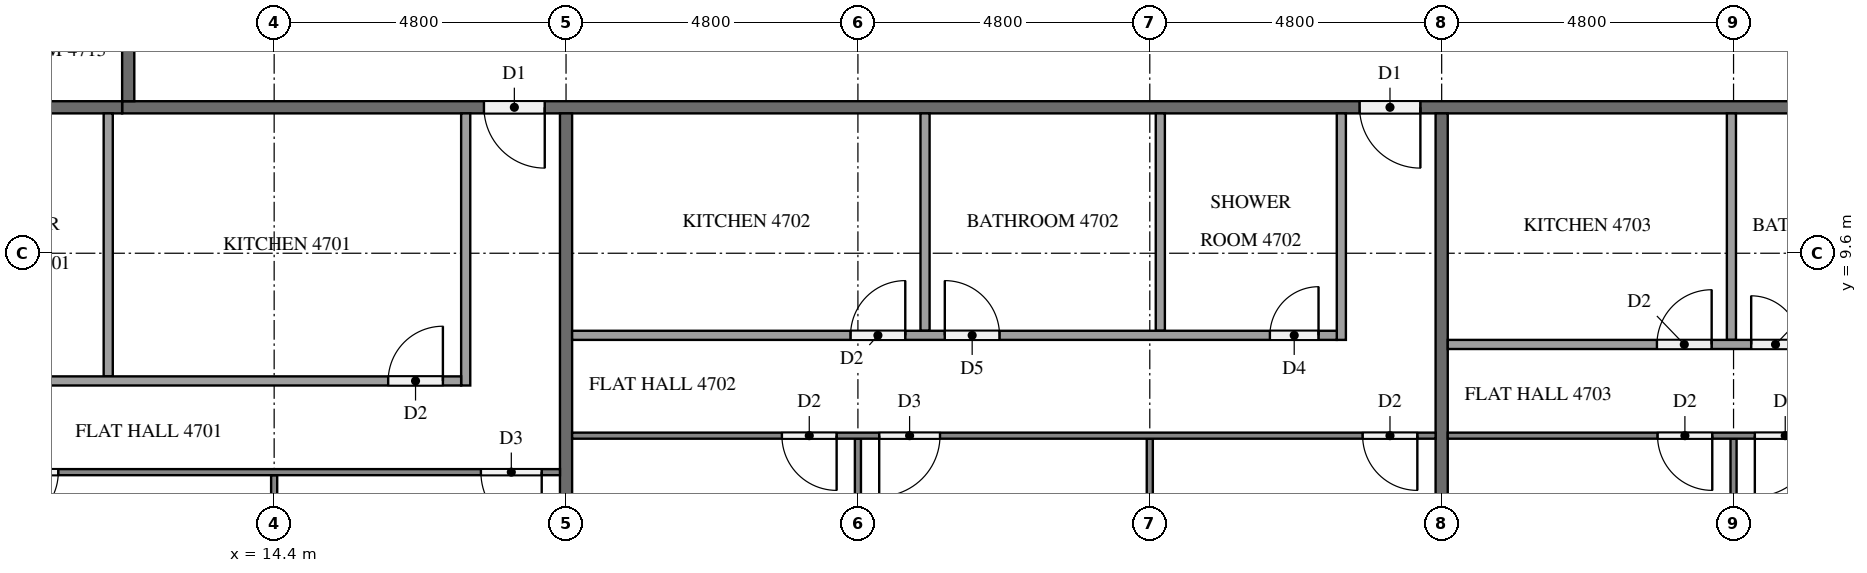
"""IFC4 building model, lengths in metres.
Left out: names, types, materials, properties, quantities, classifications, styles, units other than length and angle.
Written with IfcOpenShell. Run it as: python <this file> out.ifc"""

import sys

from ifc_helpers import new_model, si_unit, direction, frame, frame_2d, origin, place, context, subcontext, project, spatial, rectangle, extrude, element, fill, save


model = new_model("IFC4")
c1 = context("Model", 3, precision=1e-05, world=origin(), true_north=direction((0.0, 1.0)))
c2 = subcontext(c1, "Body", "Model", "MODEL_VIEW")
j1 = project(units=[si_unit("LENGTHUNIT", "METRE"), si_unit("PLANEANGLEUNIT", "RADIAN")], contexts=[c1])
p1 = place(None, origin())
s1 = spatial("IfcSite", under=j1, at=p1, CompositionType="ELEMENT")
p2 = place(p1, origin())
s2 = spatial("IfcBuilding", under=s1, at=p2, CompositionType="ELEMENT")
p3 = place(p2, frame((0.0, 0.0, 182.4)))
s3 = spatial("IfcBuildingStorey", under=s2, at=p3, CompositionType="ELEMENT", Elevation=182.4)
p4 = place(p3, frame((50.5, 12.0, 0.0), z_axis=(0.0, 0.0, 1.0), x_axis=(-1.0, 0.0, 0.0)))
e1 = element("IfcWall", 1, at=p4, inside=s3, PredefinedType="PARTITIONING", context=c2, shape_type="SweptSolid", body=[
    extrude(rectangle(XDim=38.6, YDim=0.2, at=frame_2d((19.3, 0.0))), origin(), (0.0, 0.0, 1.0), 3.2),
])
p5 = place(p4, frame((31.65, 0.0, 0.0)))
e2 = element("IfcOpeningElement", 2, at=p5, cuts=e1, PredefinedType="OPENING", context=c2, shape_type="SweptSolid", body=[
    extrude(rectangle(XDim=1.0, YDim=2.1, at=frame_2d((0.5, 1.05))), frame((0.0, 0.11, 0.0), z_axis=(0.0, -1.0, 0.0), x_axis=(1.0, 0.0, 0.0)), (0.0, 0.0, 1.0), 0.22),
])
p6 = place(p4, frame((17.25, 0.0, 0.0)))
e3 = element("IfcOpeningElement", 3, at=p6, cuts=e1, PredefinedType="OPENING", context=c2, shape_type="SweptSolid", body=[
    extrude(rectangle(XDim=1.0, YDim=2.1, at=frame_2d((0.5, 1.05))), frame((0.0, 0.11, 0.0), z_axis=(0.0, -1.0, 0.0), x_axis=(1.0, 0.0, 0.0)), (0.0, 0.0, 1.0), 0.22),
])
p7 = place(p4, frame((7.65, 0.0, 0.0)))
e4 = element("IfcOpeningElement", 4, at=p7, cuts=e1, PredefinedType="OPENING", context=c2, shape_type="SweptSolid", body=[
    extrude(rectangle(XDim=1.0, YDim=2.1, at=frame_2d((0.5, 1.05))), frame((0.0, 0.11, 0.0), z_axis=(0.0, -1.0, 0.0), x_axis=(1.0, 0.0, 0.0)), (0.0, 0.0, 1.0), 0.22),
])
p8 = place(p4, frame((5.9, 0.0, 0.0)))
e5 = element("IfcOpeningElement", 5, at=p8, cuts=e1, PredefinedType="OPENING", context=c2, shape_type="SweptSolid", body=[
    extrude(rectangle(XDim=1.1, YDim=2.1, at=frame_2d((0.55, 1.05))), frame((0.0, 0.11, 0.0), z_axis=(0.0, -1.0, 0.0), x_axis=(1.0, 0.0, 0.0)), (0.0, 0.0, 1.0), 0.22),
])
p9 = place(p3, frame((12.0, 12.1, 0.0), z_axis=(0.0, 0.0, 1.0), x_axis=(0.0, 1.0, 0.0)))
e6 = element("IfcWall", 6, at=p9, inside=s3, PredefinedType="PARTITIONING", context=c2, shape_type="SweptSolid", body=[
    extrude(rectangle(XDim=28.6, YDim=0.2, at=frame_2d((14.3, 0.0))), origin(), (0.0, 0.0, 1.0), 3.2),
])
p10 = place(p9, frame((26.65, 0.0, 0.0)))
e7 = element("IfcOpeningElement", 7, at=p10, cuts=e6, PredefinedType="OPENING", context=c2, shape_type="SweptSolid", body=[
    extrude(rectangle(XDim=1.0, YDim=2.1, at=frame_2d((0.5, 1.05))), frame((0.0, 0.11, 0.0), z_axis=(0.0, -1.0, 0.0), x_axis=(1.0, 0.0, 0.0)), (0.0, 0.0, 1.0), 0.22),
])
p11 = place(p9, frame((24.95, 0.0, 0.0)))
e8 = element("IfcOpeningElement", 8, at=p11, cuts=e6, PredefinedType="OPENING", context=c2, shape_type="SweptSolid", body=[
    extrude(rectangle(XDim=1.0, YDim=2.1, at=frame_2d((0.5, 1.05))), frame((0.0, 0.11, 0.0), z_axis=(0.0, -1.0, 0.0), x_axis=(1.0, 0.0, 0.0)), (0.0, 0.0, 1.0), 0.22),
])
p12 = place(p9, frame((12.95, 0.0, 0.0)))
e9 = element("IfcOpeningElement", 9, at=p12, cuts=e6, PredefinedType="OPENING", context=c2, shape_type="SweptSolid", body=[
    extrude(rectangle(XDim=1.0, YDim=2.1, at=frame_2d((0.5, 1.05))), frame((0.0, 0.11, 0.0), z_axis=(0.0, -1.0, 0.0), x_axis=(1.0, 0.0, 0.0)), (0.0, 0.0, 1.0), 0.22),
])
p13 = place(p3, frame((19.2, 11.9, 0.0), z_axis=(0.0, 0.0, 1.0), x_axis=(0.0, -1.0, 0.0)))
e10 = element("IfcWall", 10, at=p13, inside=s3, PredefinedType="PARTITIONING", context=c2, shape_type="SweptSolid", body=[
    extrude(rectangle(XDim=11.575, YDim=0.2, at=frame_2d((5.788, 0.0))), origin(), (0.0, 0.0, 1.0), 3.2),
])
p14 = place(p3, frame((4.9, 12.0, 0.0), z_axis=(0.0, 0.0, 1.0), x_axis=(1.0, 0.0, 0.0)))
e11 = element("IfcWall", 11, at=p14, inside=s3, PredefinedType="PARTITIONING", context=c2, shape_type="SweptSolid", body=[
    extrude(rectangle(XDim=7.0, YDim=0.2, at=frame_2d((3.5, 0.0))), origin(), (0.0, 0.0, 1.0), 3.2),
])
p15 = place(p3, frame((33.6, 11.9, 0.0), z_axis=(0.0, 0.0, 1.0), x_axis=(0.0, -1.0, 0.0)))
e12 = element("IfcWall", 12, at=p15, inside=s3, PredefinedType="PARTITIONING", context=c2, shape_type="SweptSolid", body=[
    extrude(rectangle(XDim=11.8, YDim=0.2, at=frame_2d((5.9, 0.0))), origin(), (0.0, 0.0, 1.0), 3.2),
])
p16 = place(p3, frame((14.4, 5.95, 0.0), z_axis=(0.0, 0.0, 1.0), x_axis=(0.0, -1.0, 0.0)))
e13 = element("IfcWall", 13, at=p16, inside=s3, PredefinedType="PARTITIONING", context=c2, shape_type="SweptSolid", body=[
    extrude(rectangle(XDim=5.85, YDim=0.1, at=frame_2d((2.925, 0.0))), origin(), (0.0, 0.0, 1.0), 3.2),
])
p17 = place(p3, frame((19.1, 6.0, 0.0), z_axis=(0.0, 0.0, 1.0), x_axis=(-1.0, 0.0, 0.0)))
e14 = element("IfcWall", 14, at=p17, inside=s3, PredefinedType="PARTITIONING", context=c2, shape_type="SweptSolid", body=[
    extrude(rectangle(XDim=14.2, YDim=0.1, at=frame_2d((7.1, 0.0))), origin(), (0.0, 0.0, 1.0), 3.2),
])
p18 = place(p17, frame((0.3, 0.0, 0.0)))
e15 = element("IfcOpeningElement", 15, at=p18, cuts=e14, PredefinedType="OPENING", context=c2, shape_type="SweptSolid", body=[
    extrude(rectangle(XDim=1.0, YDim=2.1, at=frame_2d((0.5, 1.05))), frame((0.0, 0.06, 0.0), z_axis=(0.0, -1.0, 0.0), x_axis=(1.0, 0.0, 0.0)), (0.0, 0.0, 1.0), 0.12),
])
p19 = place(p17, frame((8.25, 0.0, 0.0)))
e16 = element("IfcOpeningElement", 16, at=p19, cuts=e14, PredefinedType="OPENING", context=c2, shape_type="SweptSolid", body=[
    extrude(rectangle(XDim=0.9, YDim=2.1, at=frame_2d((0.45, 1.05))), frame((0.0, 0.06, 0.0), z_axis=(0.0, -1.0, 0.0), x_axis=(1.0, 0.0, 0.0)), (0.0, 0.0, 1.0), 0.12),
])
p20 = place(p17, frame((9.85, 0.0, 0.0)))
e17 = element("IfcOpeningElement", 17, at=p20, cuts=e14, PredefinedType="OPENING", context=c2, shape_type="SweptSolid", body=[
    extrude(rectangle(XDim=0.9, YDim=2.1, at=frame_2d((0.45, 1.05))), frame((0.0, 0.06, 0.0), z_axis=(0.0, -1.0, 0.0), x_axis=(1.0, 0.0, 0.0)), (0.0, 0.0, 1.0), 0.12),
])
p21 = place(p3, frame((11.671, 11.9, 0.0), z_axis=(0.0, 0.0, 1.0), x_axis=(0.0, -1.0, 0.0)))
e18 = element("IfcWall", 18, at=p21, inside=s3, PredefinedType="PARTITIONING", context=c2, shape_type="SweptSolid", body=[
    extrude(rectangle(XDim=4.325, YDim=0.15, at=frame_2d((2.163, 0.0))), origin(), (0.0, 0.0, 1.0), 3.2),
])
p22 = place(p3, frame((17.55, 11.9, 0.0), z_axis=(0.0, 0.0, 1.0), x_axis=(0.0, -1.0, 0.0)))
e19 = element("IfcWall", 19, at=p22, inside=s3, PredefinedType="PARTITIONING", context=c2, shape_type="SweptSolid", body=[
    extrude(rectangle(XDim=4.475, YDim=0.15, at=frame_2d((2.237, 0.0))), origin(), (0.0, 0.0, 1.0), 3.2),
])
p23 = place(p3, frame((4.9, 7.5, 0.0), z_axis=(0.0, 0.0, 1.0), x_axis=(1.0, 0.0, 0.0)))
e20 = element("IfcWall", 20, at=p23, inside=s3, PredefinedType="PARTITIONING", context=c2, shape_type="SweptSolid", body=[
    extrude(rectangle(XDim=12.575, YDim=0.15, at=frame_2d((6.288, 0.0))), origin(), (0.0, 0.0, 1.0), 3.2),
])
p24 = place(p23, frame((11.375, 0.0, 0.0)))
e21 = element("IfcOpeningElement", 21, at=p24, cuts=e20, PredefinedType="OPENING", context=c2, shape_type="SweptSolid", body=[
    extrude(rectangle(XDim=0.9, YDim=2.1, at=frame_2d((0.45, 1.05))), frame((0.0, 0.085, 0.0), z_axis=(0.0, -1.0, 0.0), x_axis=(1.0, 0.0, 0.0)), (0.0, 0.0, 1.0), 0.17),
])
p25 = place(p23, frame((4.194, 0.0, 0.0)))
e22 = element("IfcOpeningElement", 22, at=p25, cuts=e20, PredefinedType="OPENING", context=c2, shape_type="SweptSolid", body=[
    extrude(rectangle(XDim=0.8, YDim=2.1, at=frame_2d((0.4, 1.05))), frame((0.0, 0.085, 0.0), z_axis=(0.0, -1.0, 0.0), x_axis=(1.0, 0.0, 0.0)), (0.0, 0.0, 1.0), 0.17),
])
p26 = place(p23, frame((2.644, 0.0, 0.0)))
e23 = element("IfcOpeningElement", 23, at=p26, cuts=e20, PredefinedType="OPENING", context=c2, shape_type="SweptSolid", body=[
    extrude(rectangle(XDim=0.9, YDim=2.1, at=frame_2d((0.45, 1.05))), frame((0.0, 0.085, 0.0), z_axis=(0.0, -1.0, 0.0), x_axis=(1.0, 0.0, 0.0)), (0.0, 0.0, 1.0), 0.17),
])
p27 = place(p3, frame((28.8, 6.55, 0.0), z_axis=(0.0, 0.0, 1.0), x_axis=(0.0, -1.0, 0.0)))
e24 = element("IfcWall", 24, at=p27, inside=s3, PredefinedType="PARTITIONING", context=c2, shape_type="SweptSolid", body=[
    extrude(rectangle(XDim=6.225, YDim=0.1, at=frame_2d((3.113, 0.0))), origin(), (0.0, 0.0, 1.0), 3.2),
])
p28 = place(p3, frame((24.0, 6.55, 0.0), z_axis=(0.0, 0.0, 1.0), x_axis=(0.0, -1.0, 0.0)))
e25 = element("IfcWall", 25, at=p28, inside=s3, PredefinedType="PARTITIONING", context=c2, shape_type="SweptSolid", body=[
    extrude(rectangle(XDim=6.45, YDim=0.1, at=frame_2d((3.225, 0.0))), origin(), (0.0, 0.0, 1.0), 3.2),
])
p29 = place(p3, frame((33.5, 6.6, 0.0), z_axis=(0.0, 0.0, 1.0), x_axis=(-1.0, 0.0, 0.0)))
e26 = element("IfcWall", 26, at=p29, inside=s3, PredefinedType="PARTITIONING", context=c2, shape_type="SweptSolid", body=[
    extrude(rectangle(XDim=14.2, YDim=0.1, at=frame_2d((7.1, 0.0))), origin(), (0.0, 0.0, 1.0), 3.2),
])
p30 = place(p29, frame((0.3, 0.0, 0.0)))
e27 = element("IfcOpeningElement", 27, at=p30, cuts=e26, PredefinedType="OPENING", context=c2, shape_type="SweptSolid", body=[
    extrude(rectangle(XDim=0.9, YDim=2.1, at=frame_2d((0.45, 1.05))), frame((0.0, 0.06, 0.0), z_axis=(0.0, -1.0, 0.0), x_axis=(1.0, 0.0, 0.0)), (0.0, 0.0, 1.0), 0.12),
])
p31 = place(p29, frame((8.15, 0.0, 0.0)))
e28 = element("IfcOpeningElement", 28, at=p31, cuts=e26, PredefinedType="OPENING", context=c2, shape_type="SweptSolid", body=[
    extrude(rectangle(XDim=1.0, YDim=2.1, at=frame_2d((0.5, 1.05))), frame((0.0, 0.06, 0.0), z_axis=(0.0, -1.0, 0.0), x_axis=(1.0, 0.0, 0.0)), (0.0, 0.0, 1.0), 0.12),
])
p32 = place(p29, frame((9.85, 0.0, 0.0)))
e29 = element("IfcOpeningElement", 29, at=p32, cuts=e26, PredefinedType="OPENING", context=c2, shape_type="SweptSolid", body=[
    extrude(rectangle(XDim=0.9, YDim=2.1, at=frame_2d((0.45, 1.05))), frame((0.0, 0.06, 0.0), z_axis=(0.0, -1.0, 0.0), x_axis=(1.0, 0.0, 0.0)), (0.0, 0.0, 1.0), 0.12),
])
for number, where, z_axis, x_axis in (
    (30, (28.973, 11.9, 0.0), (0.0, 0.0, 1.0), (0.0, -1.0, 0.0)),
    (31, (25.104, 11.9, 0.0), (0.0, 0.0, 1.0), (0.0, -1.0, 0.0)),
):
    element("IfcWall", number, at=place(p3, frame(where, z_axis=z_axis, x_axis=x_axis)), inside=s3, PredefinedType="PARTITIONING", context=c2, shape_type="SweptSolid", body=[
        extrude(rectangle(XDim=3.575, YDim=0.15, at=frame_2d((1.788, 0.0))), origin(), (0.0, 0.0, 1.0), 3.2),
    ])
p33 = place(p3, frame((31.95, 11.9, 0.0), z_axis=(0.0, 0.0, 1.0), x_axis=(0.0, -1.0, 0.0)))
e32 = element("IfcWall", 32, at=p33, inside=s3, PredefinedType="PARTITIONING", context=c2, shape_type="SweptSolid", body=[
    extrude(rectangle(XDim=3.725, YDim=0.15, at=frame_2d((1.862, 0.0))), origin(), (0.0, 0.0, 1.0), 3.2),
])
p34 = place(p3, frame((19.3, 8.25, 0.0), z_axis=(0.0, 0.0, 1.0), x_axis=(1.0, 0.0, 0.0)))
e33 = element("IfcWall", 33, at=p34, inside=s3, PredefinedType="PARTITIONING", context=c2, shape_type="SweptSolid", body=[
    extrude(rectangle(XDim=12.575, YDim=0.15, at=frame_2d((6.288, 0.0))), origin(), (0.0, 0.0, 1.0), 3.2),
])
p35 = place(p34, frame((11.475, 0.0, 0.0)))
e34 = element("IfcOpeningElement", 34, at=p35, cuts=e33, PredefinedType="OPENING", context=c2, shape_type="SweptSolid", body=[
    extrude(rectangle(XDim=0.8, YDim=2.1, at=frame_2d((0.4, 1.05))), frame((0.0, 0.085, 0.0), z_axis=(0.0, -1.0, 0.0), x_axis=(1.0, 0.0, 0.0)), (0.0, 0.0, 1.0), 0.17),
])
p36 = place(p34, frame((6.129, 0.0, 0.0)))
e35 = element("IfcOpeningElement", 35, at=p36, cuts=e33, PredefinedType="OPENING", context=c2, shape_type="SweptSolid", body=[
    extrude(rectangle(XDim=0.9, YDim=2.1, at=frame_2d((0.45, 1.05))), frame((0.0, 0.085, 0.0), z_axis=(0.0, -1.0, 0.0), x_axis=(1.0, 0.0, 0.0)), (0.0, 0.0, 1.0), 0.17),
])
p37 = place(p34, frame((4.579, 0.0, 0.0)))
e36 = element("IfcOpeningElement", 36, at=p37, cuts=e33, PredefinedType="OPENING", context=c2, shape_type="SweptSolid", body=[
    extrude(rectangle(XDim=0.9, YDim=2.1, at=frame_2d((0.45, 1.05))), frame((0.0, 0.085, 0.0), z_axis=(0.0, -1.0, 0.0), x_axis=(1.0, 0.0, 0.0)), (0.0, 0.0, 1.0), 0.17),
])
p38 = place(p3, frame((38.4, 6.55, 0.0), z_axis=(0.0, 0.0, 1.0), x_axis=(0.0, -1.0, 0.0)))
e37 = element("IfcWall", 37, at=p38, inside=s3, PredefinedType="PARTITIONING", context=c2, shape_type="SweptSolid", body=[
    extrude(rectangle(XDim=6.225, YDim=0.1, at=frame_2d((3.113, 0.0))), origin(), (0.0, 0.0, 1.0), 3.2),
])
p39 = place(p3, frame((43.1, 6.6, 0.0), z_axis=(0.0, 0.0, 1.0), x_axis=(-1.0, 0.0, 0.0)))
e38 = element("IfcWall", 38, at=p39, inside=s3, PredefinedType="PARTITIONING", context=c2, shape_type="SweptSolid", body=[
    extrude(rectangle(XDim=9.4, YDim=0.1, at=frame_2d((4.7, 0.0))), origin(), (0.0, 0.0, 1.0), 3.2),
])
p40 = place(p39, frame((3.35, 0.0, 0.0)))
e39 = element("IfcOpeningElement", 39, at=p40, cuts=e38, PredefinedType="OPENING", context=c2, shape_type="SweptSolid", body=[
    extrude(rectangle(XDim=1.0, YDim=2.1, at=frame_2d((0.5, 1.05))), frame((0.0, 0.06, 0.0), z_axis=(0.0, -1.0, 0.0), x_axis=(1.0, 0.0, 0.0)), (0.0, 0.0, 1.0), 0.12),
])
p41 = place(p39, frame((5.05, 0.0, 0.0)))
e40 = element("IfcOpeningElement", 40, at=p41, cuts=e38, PredefinedType="OPENING", context=c2, shape_type="SweptSolid", body=[
    extrude(rectangle(XDim=0.9, YDim=2.1, at=frame_2d((0.45, 1.05))), frame((0.0, 0.06, 0.0), z_axis=(0.0, -1.0, 0.0), x_axis=(1.0, 0.0, 0.0)), (0.0, 0.0, 1.0), 0.12),
])
p42 = place(p3, frame((38.365, 11.9, 0.0), z_axis=(0.0, 0.0, 1.0), x_axis=(0.0, -1.0, 0.0)))
e41 = element("IfcWall", 41, at=p42, inside=s3, PredefinedType="PARTITIONING", context=c2, shape_type="SweptSolid", body=[
    extrude(rectangle(XDim=3.725, YDim=0.15, at=frame_2d((1.862, 0.0))), origin(), (0.0, 0.0, 1.0), 3.2),
])
p43 = place(p3, frame((33.7, 8.1, 0.0), z_axis=(0.0, 0.0, 1.0), x_axis=(1.0, 0.0, 0.0)))
e42 = element("IfcWall", 42, at=p43, inside=s3, PredefinedType="PARTITIONING", context=c2, shape_type="SweptSolid", body=[
    extrude(rectangle(XDim=7.775, YDim=0.15, at=frame_2d((3.888, 0.0))), origin(), (0.0, 0.0, 1.0), 3.2),
])
p44 = place(p43, frame((4.99, 0.0, 0.0)))
e43 = element("IfcOpeningElement", 43, at=p44, cuts=e42, PredefinedType="OPENING", context=c2, shape_type="SweptSolid", body=[
    extrude(rectangle(XDim=0.8, YDim=2.1, at=frame_2d((0.4, 1.05))), frame((0.0, 0.085, 0.0), z_axis=(0.0, -1.0, 0.0), x_axis=(1.0, 0.0, 0.0)), (0.0, 0.0, 1.0), 0.17),
])
p45 = place(p43, frame((3.44, 0.0, 0.0)))
e44 = element("IfcOpeningElement", 44, at=p45, cuts=e42, PredefinedType="OPENING", context=c2, shape_type="SweptSolid", body=[
    extrude(rectangle(XDim=0.9, YDim=2.1, at=frame_2d((0.45, 1.05))), frame((0.0, 0.085, 0.0), z_axis=(0.0, -1.0, 0.0), x_axis=(1.0, 0.0, 0.0)), (0.0, 0.0, 1.0), 0.17),
])
p46 = place(p5, origin())
e45 = element("IfcDoor", 45, at=p46, inside=s3, OperationType="SINGLE_SWING_LEFT", PredefinedType="DOOR", context=c2, shape_type="SweptSolid", body=[
    extrude(rectangle(XDim=1.0, YDim=2.1, at=frame_2d((0.5, 1.05))), frame((0.0, 0.025, 0.0), z_axis=(0.0, -1.0, 0.0), x_axis=(1.0, 0.0, 0.0)), (0.0, 0.0, 1.0), 0.05),
])
fill(e2, e45)
p47 = place(p6, origin())
e46 = element("IfcDoor", 46, at=p47, inside=s3, OperationType="SINGLE_SWING_LEFT", PredefinedType="DOOR", context=c2, shape_type="SweptSolid", body=[
    extrude(rectangle(XDim=1.0, YDim=2.1, at=frame_2d((0.5, 1.05))), frame((0.0, 0.025, 0.0), z_axis=(0.0, -1.0, 0.0), x_axis=(1.0, 0.0, 0.0)), (0.0, 0.0, 1.0), 0.05),
])
fill(e3, e46)
p48 = place(p18, origin())
e47 = element("IfcDoor", 47, at=p48, inside=s3, OperationType="SINGLE_SWING_LEFT", PredefinedType="DOOR", context=c2, shape_type="SweptSolid", body=[
    extrude(rectangle(XDim=1.0, YDim=2.1, at=frame_2d((0.5, 1.05))), frame((0.0, 0.025, 0.0), z_axis=(0.0, -1.0, 0.0), x_axis=(1.0, 0.0, 0.0)), (0.0, 0.0, 1.0), 0.05),
])
fill(e15, e47)
p49 = place(p19, origin())
e48 = element("IfcDoor", 48, at=p49, inside=s3, OperationType="SINGLE_SWING_RIGHT", PredefinedType="DOOR", context=c2, shape_type="SweptSolid", body=[
    extrude(rectangle(XDim=0.9, YDim=2.1, at=frame_2d((0.45, 1.05))), frame((0.0, 0.025, 0.0), z_axis=(0.0, -1.0, 0.0), x_axis=(1.0, 0.0, 0.0)), (0.0, 0.0, 1.0), 0.05),
])
fill(e16, e48)
p50 = place(p24, origin())
e49 = element("IfcDoor", 49, at=p50, inside=s3, OperationType="SINGLE_SWING_RIGHT", PredefinedType="DOOR", context=c2, shape_type="SweptSolid", body=[
    extrude(rectangle(XDim=0.9, YDim=2.1, at=frame_2d((0.45, 1.05))), frame((0.0, 0.025, 0.0), z_axis=(0.0, -1.0, 0.0), x_axis=(1.0, 0.0, 0.0)), (0.0, 0.0, 1.0), 0.05),
])
fill(e21, e49)
p51 = place(p30, origin())
e50 = element("IfcDoor", 50, at=p51, inside=s3, OperationType="SINGLE_SWING_LEFT", PredefinedType="DOOR", context=c2, shape_type="SweptSolid", body=[
    extrude(rectangle(XDim=0.9, YDim=2.1, at=frame_2d((0.45, 1.05))), frame((0.0, 0.025, 0.0), z_axis=(0.0, -1.0, 0.0), x_axis=(1.0, 0.0, 0.0)), (0.0, 0.0, 1.0), 0.05),
])
fill(e27, e50)
p52 = place(p31, origin())
e51 = element("IfcDoor", 51, at=p52, inside=s3, OperationType="SINGLE_SWING_RIGHT", PredefinedType="DOOR", context=c2, shape_type="SweptSolid", body=[
    extrude(rectangle(XDim=1.0, YDim=2.1, at=frame_2d((0.5, 1.05))), frame((0.0, 0.025, 0.0), z_axis=(0.0, -1.0, 0.0), x_axis=(1.0, 0.0, 0.0)), (0.0, 0.0, 1.0), 0.05),
])
fill(e28, e51)
p53 = place(p32, origin())
e52 = element("IfcDoor", 52, at=p53, inside=s3, OperationType="SINGLE_SWING_LEFT", PredefinedType="DOOR", context=c2, shape_type="SweptSolid", body=[
    extrude(rectangle(XDim=0.9, YDim=2.1, at=frame_2d((0.45, 1.05))), frame((0.0, 0.025, 0.0), z_axis=(0.0, -1.0, 0.0), x_axis=(1.0, 0.0, 0.0)), (0.0, 0.0, 1.0), 0.05),
])
fill(e29, e52)
p54 = place(p35, origin())
e53 = element("IfcDoor", 53, at=p54, inside=s3, OperationType="SINGLE_SWING_RIGHT", PredefinedType="DOOR", context=c2, shape_type="SweptSolid", body=[
    extrude(rectangle(XDim=0.8, YDim=2.1, at=frame_2d((0.4, 1.05))), frame((0.0, 0.025, 0.0), z_axis=(0.0, -1.0, 0.0), x_axis=(1.0, 0.0, 0.0)), (0.0, 0.0, 1.0), 0.05),
])
fill(e34, e53)
p55 = place(p36, origin())
e54 = element("IfcDoor", 54, at=p55, inside=s3, OperationType="SINGLE_SWING_LEFT", PredefinedType="DOOR", context=c2, shape_type="SweptSolid", body=[
    extrude(rectangle(XDim=0.9, YDim=2.1, at=frame_2d((0.45, 1.05))), frame((0.0, 0.025, 0.0), z_axis=(0.0, -1.0, 0.0), x_axis=(1.0, 0.0, 0.0)), (0.0, 0.0, 1.0), 0.05),
])
fill(e35, e54)
p56 = place(p37, origin())
e55 = element("IfcDoor", 55, at=p56, inside=s3, OperationType="SINGLE_SWING_RIGHT", PredefinedType="DOOR", context=c2, shape_type="SweptSolid", body=[
    extrude(rectangle(XDim=0.9, YDim=2.1, at=frame_2d((0.45, 1.05))), frame((0.0, 0.025, 0.0), z_axis=(0.0, -1.0, 0.0), x_axis=(1.0, 0.0, 0.0)), (0.0, 0.0, 1.0), 0.05),
])
fill(e36, e55)
p57 = place(p40, origin())
e56 = element("IfcDoor", 56, at=p57, inside=s3, OperationType="SINGLE_SWING_RIGHT", PredefinedType="DOOR", context=c2, shape_type="SweptSolid", body=[
    extrude(rectangle(XDim=1.0, YDim=2.1, at=frame_2d((0.5, 1.05))), frame((0.0, 0.025, 0.0), z_axis=(0.0, -1.0, 0.0), x_axis=(1.0, 0.0, 0.0)), (0.0, 0.0, 1.0), 0.05),
])
fill(e39, e56)
p58 = place(p41, origin())
e57 = element("IfcDoor", 57, at=p58, inside=s3, OperationType="SINGLE_SWING_LEFT", PredefinedType="DOOR", context=c2, shape_type="SweptSolid", body=[
    extrude(rectangle(XDim=0.9, YDim=2.1, at=frame_2d((0.45, 1.05))), frame((0.0, 0.025, 0.0), z_axis=(0.0, -1.0, 0.0), x_axis=(1.0, 0.0, 0.0)), (0.0, 0.0, 1.0), 0.05),
])
fill(e40, e57)
p59 = place(p44, origin())
e58 = element("IfcDoor", 58, at=p59, inside=s3, OperationType="SINGLE_SWING_LEFT", PredefinedType="DOOR", context=c2, shape_type="SweptSolid", body=[
    extrude(rectangle(XDim=0.8, YDim=2.1, at=frame_2d((0.4, 1.05))), frame((0.0, 0.025, 0.0), z_axis=(0.0, -1.0, 0.0), x_axis=(1.0, 0.0, 0.0)), (0.0, 0.0, 1.0), 0.05),
])
fill(e43, e58)
p60 = place(p45, origin())
e59 = element("IfcDoor", 59, at=p60, inside=s3, OperationType="SINGLE_SWING_RIGHT", PredefinedType="DOOR", context=c2, shape_type="SweptSolid", body=[
    extrude(rectangle(XDim=0.9, YDim=2.1, at=frame_2d((0.45, 1.05))), frame((0.0, 0.025, 0.0), z_axis=(0.0, -1.0, 0.0), x_axis=(1.0, 0.0, 0.0)), (0.0, 0.0, 1.0), 0.05),
])
fill(e44, e59)
save(model, sys.argv[1])
